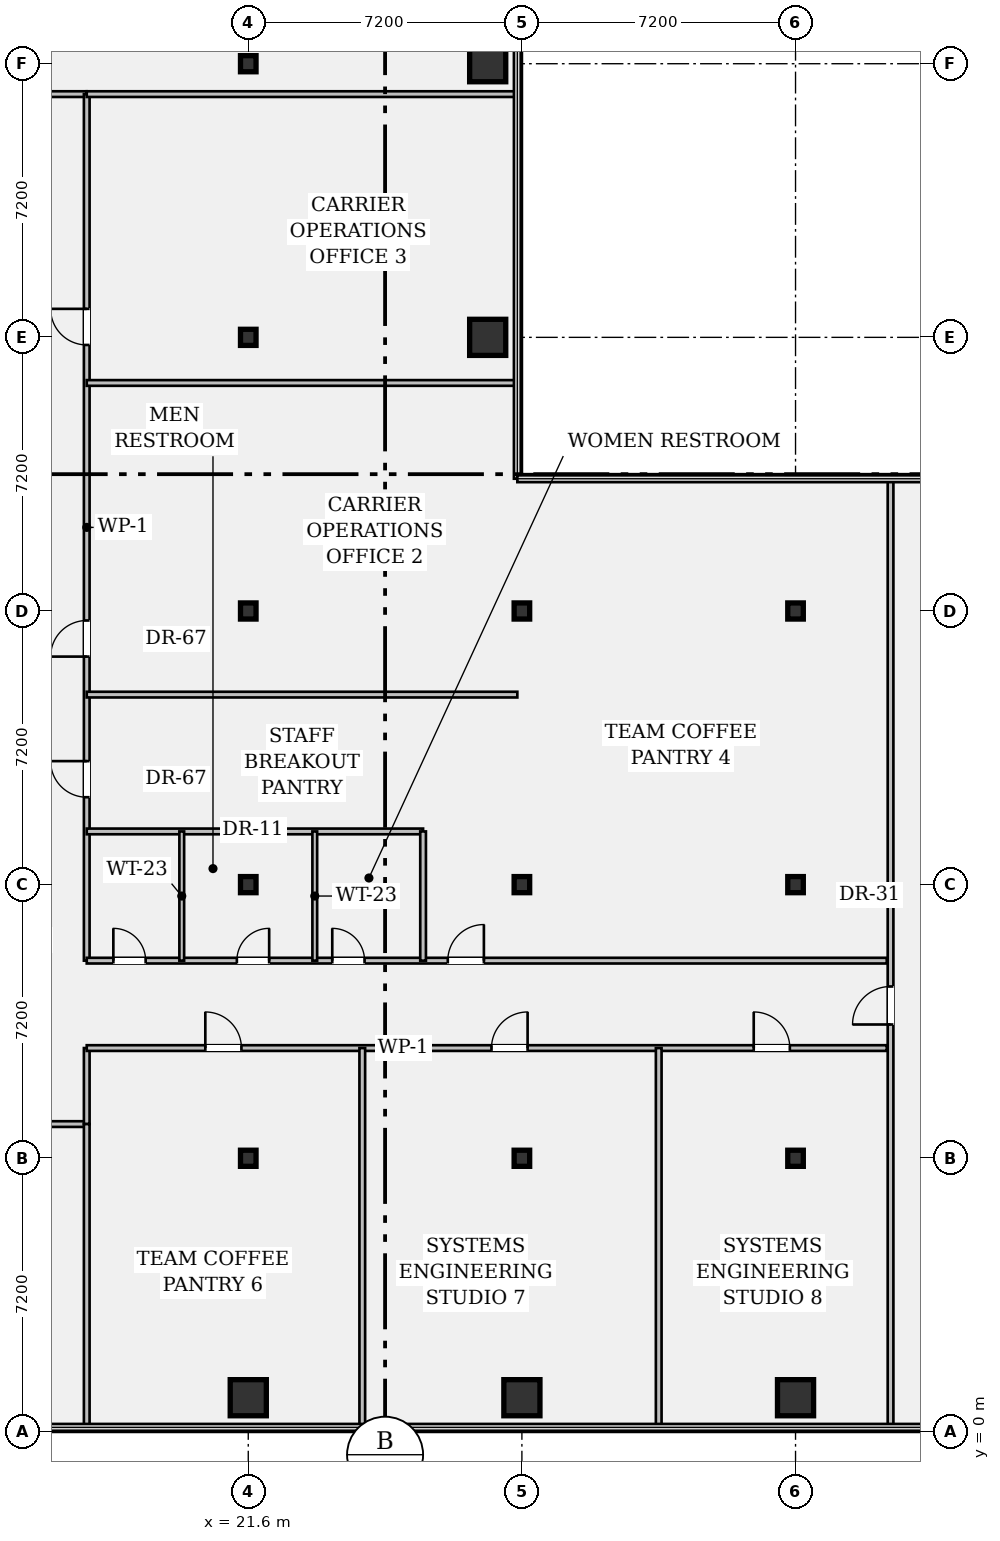
"""IFC4 building model, lengths in metres.
Left out: names, types, materials, properties, quantities, classifications, styles, units other than length and angle.
Written with IfcOpenShell. Run it as: python <this file> out.ifc"""

import sys

from ifc_helpers import new_model, si_unit, direction, frame, frame_2d, origin, origin_2d, place, context, subcontext, project, spatial, rectangle, hollow_rectangle, i_section, extrude, element, fill, save


model = new_model("IFC4")
c1 = context("Model", 3, precision=1e-05, world=origin(), true_north=direction((0.0, 1.0)))
c2 = subcontext(c1, "Body", "Model", "MODEL_VIEW")
j1 = project(units=[si_unit("LENGTHUNIT", "METRE"), si_unit("PLANEANGLEUNIT", "RADIAN")], contexts=[c1])
p1 = place(None, origin())
s1 = spatial("IfcSite", under=j1, at=p1, CompositionType="ELEMENT")
p2 = place(p1, origin())
s2 = spatial("IfcBuilding", under=s1, at=p2, CompositionType="ELEMENT")
p3 = place(p2, frame((0.0, 0.0, 88.9)))
s3 = spatial("IfcBuildingStorey", under=s2, at=p3, CompositionType="ELEMENT", Elevation=88.9)
p4 = place(p3, frame((21.6, 0.9, 0.0), z_axis=(0.0, 0.0, 1.0), x_axis=(1.0, 0.0, 0.0)))
e1 = element("IfcColumn", 1, at=p4, inside=s3, PredefinedType="COLUMN", context=c2, shape_type="SweptSolid", body=[
    extrude(hollow_rectangle(XDim=0.95, YDim=0.95, WallThickness=0.06, at=origin_2d()), origin(), (0.0, 0.0, 1.0), 3.57),
])
for number, where, z_axis, x_axis in (
    (2, (21.6, 7.2, 0.0), (0.0, 0.0, 1.0), (1.0, 0.0, 0.0)),
    (3, (21.6, 14.4, 0.0), (0.0, 0.0, 1.0), (1.0, 0.0, 0.0)),
    (4, (21.6, 21.6, 0.0), (0.0, 0.0, 1.0), (1.0, 0.0, 0.0)),
    (5, (21.6, 28.8, 0.0), (0.0, 0.0, 1.0), (1.0, 0.0, 0.0)),
    (6, (21.6, 36.0, 0.0), (0.0, 0.0, 1.0), (1.0, 0.0, 0.0)),
):
    element("IfcColumn", number, at=place(p3, frame(where, z_axis=z_axis, x_axis=x_axis)), inside=s3, PredefinedType="COLUMN", context=c2, shape_type="SweptSolid", body=[
        extrude(i_section(OverallWidth=0.409, OverallDepth=0.424, WebThickness=0.033, FlangeThickness=0.052, FilletRadius=0.018, at=origin_2d()), origin(), (0.0, 0.0, 1.0), 3.57),
    ])
for number, where, z_axis, x_axis in (
    (7, (27.9, 28.8, 0.0), (0.0, 0.0, 1.0), (1.0, 0.0, 0.0)),
    (8, (27.9, 36.0, 0.0), (0.0, 0.0, 1.0), (1.0, 0.0, 0.0)),
):
    element("IfcColumn", number, at=place(p3, frame(where, z_axis=z_axis, x_axis=x_axis)), inside=s3, PredefinedType="COLUMN", context=c2, shape_type="SweptSolid", body=[
        extrude(hollow_rectangle(XDim=0.95, YDim=0.95, WallThickness=0.06, at=origin_2d()), origin(), (0.0, 0.0, 1.0), 3.85),
    ])
p5 = place(p3, frame((28.8, 0.9, 0.0), z_axis=(0.0, 0.0, 1.0), x_axis=(1.0, 0.0, 0.0)))
e9 = element("IfcColumn", 9, at=p5, inside=s3, PredefinedType="COLUMN", context=c2, shape_type="SweptSolid", body=[
    extrude(hollow_rectangle(XDim=0.95, YDim=0.95, WallThickness=0.06, at=origin_2d()), origin(), (0.0, 0.0, 1.0), 3.57),
])
for number, where, z_axis, x_axis in (
    (10, (28.8, 7.2, 0.0), (0.0, 0.0, 1.0), (1.0, 0.0, 0.0)),
    (11, (28.8, 14.4, 0.0), (0.0, 0.0, 1.0), (1.0, 0.0, 0.0)),
    (12, (28.8, 21.6, 0.0), (0.0, 0.0, 1.0), (1.0, 0.0, 0.0)),
):
    element("IfcColumn", number, at=place(p3, frame(where, z_axis=z_axis, x_axis=x_axis)), inside=s3, PredefinedType="COLUMN", context=c2, shape_type="SweptSolid", body=[
        extrude(i_section(OverallWidth=0.409, OverallDepth=0.424, WebThickness=0.033, FlangeThickness=0.052, FilletRadius=0.018, at=origin_2d()), origin(), (0.0, 0.0, 1.0), 3.57),
    ])
p6 = place(p3, frame((36.0, 0.9, 0.0), z_axis=(0.0, 0.0, 1.0), x_axis=(1.0, 0.0, 0.0)))
e13 = element("IfcColumn", 13, at=p6, inside=s3, PredefinedType="COLUMN", context=c2, shape_type="SweptSolid", body=[
    extrude(hollow_rectangle(XDim=0.95, YDim=0.95, WallThickness=0.06, at=origin_2d()), origin(), (0.0, 0.0, 1.0), 3.57),
])
for number, where, z_axis, x_axis in (
    (14, (36.0, 7.2, 0.0), (0.0, 0.0, 1.0), (1.0, 0.0, 0.0)),
    (15, (36.0, 14.4, 0.0), (0.0, 0.0, 1.0), (1.0, 0.0, 0.0)),
    (16, (36.0, 21.6, 0.0), (0.0, 0.0, 1.0), (1.0, 0.0, 0.0)),
):
    element("IfcColumn", number, at=place(p3, frame(where, z_axis=z_axis, x_axis=x_axis)), inside=s3, PredefinedType="COLUMN", context=c2, shape_type="SweptSolid", body=[
        extrude(i_section(OverallWidth=0.409, OverallDepth=0.424, WebThickness=0.033, FlangeThickness=0.052, FilletRadius=0.018, at=origin_2d()), origin(), (0.0, 0.0, 1.0), 3.57),
    ])
p7 = place(p3, frame((14.4, 8.1, 0.0), z_axis=(0.0, 0.0, 1.0), x_axis=(1.0, 0.0, 0.0)))
e17 = element("IfcWall", 17, at=p7, inside=s3, PredefinedType="PARTITIONING", context=c2, shape_type="SweptSolid", body=[
    extrude(rectangle(XDim=2.95, YDim=0.15, at=frame_2d((1.475, 0.0))), origin(), (0.0, 0.0, 1.0), 3.088),
])
p8 = place(p7, frame((0.95, 0.0, 0.0)))
e18 = element("IfcOpeningElement", 18, at=p8, cuts=e17, PredefinedType="OPENING", context=c2, shape_type="SweptSolid", body=[
    extrude(rectangle(XDim=0.95, YDim=2.15, at=frame_2d((0.475, 1.075))), frame((0.0, 0.087, 0.0), z_axis=(0.0, -1.0, 0.0), x_axis=(1.0, 0.0, 0.0)), (0.0, 0.0, 1.0), 0.174),
])
p9 = place(p3, frame((14.4, 35.2, 0.0), z_axis=(0.0, 0.0, 1.0), x_axis=(1.0, 0.0, 0.0)))
e19 = element("IfcWall", 19, at=p9, inside=s3, PredefinedType="PARTITIONING", context=c2, shape_type="SweptSolid", body=[
    extrude(rectangle(XDim=2.95, YDim=0.15, at=frame_2d((1.475, 0.0))), origin(), (0.0, 0.0, 1.0), 3.088),
])
p10 = place(p9, frame((0.95, 0.0, 0.0)))
e20 = element("IfcOpeningElement", 20, at=p10, cuts=e19, PredefinedType="OPENING", context=c2, shape_type="SweptSolid", body=[
    extrude(rectangle(XDim=1.0, YDim=2.15, at=frame_2d((0.5, 1.075))), frame((0.0, 0.087, 0.0), z_axis=(0.0, -1.0, 0.0), x_axis=(1.0, 0.0, 0.0)), (0.0, 0.0, 1.0), 0.174),
])
p11 = place(p3, frame((17.35, 8.1, 0.0), z_axis=(0.0, 0.0, 1.0), x_axis=(0.0, 1.0, 0.0)))
e21 = element("IfcWall", 21, at=p11, inside=s3, PredefinedType="PARTITIONING", context=c2, shape_type="SweptSolid", body=[
    extrude(rectangle(XDim=2.0, YDim=0.15, at=frame_2d((1.0, 0.0))), origin(), (0.0, 0.0, 1.0), 3.57),
])
p12 = place(p3, frame((17.35, 12.4, 0.0), z_axis=(0.0, 0.0, 1.0), x_axis=(0.0, 1.0, 0.0)))
e22 = element("IfcWall", 22, at=p12, inside=s3, PredefinedType="PARTITIONING", context=c2, shape_type="SweptSolid", body=[
    extrude(rectangle(XDim=22.8, YDim=0.15, at=frame_2d((11.4, 0.0))), origin(), (0.0, 0.0, 1.0), 2.783),
])
p13 = place(p12, frame((4.3, 0.0, 0.0)))
e23 = element("IfcOpeningElement", 23, at=p13, cuts=e22, PredefinedType="OPENING", context=c2, shape_type="SweptSolid", body=[
    extrude(rectangle(XDim=0.95, YDim=2.15, at=frame_2d((0.475, 1.075))), frame((0.0, 0.087, 0.0), z_axis=(0.0, -1.0, 0.0), x_axis=(1.0, 0.0, 0.0)), (0.0, 0.0, 1.0), 0.174),
])
p14 = place(p12, frame((8.0, 0.0, 0.0)))
e24 = element("IfcOpeningElement", 24, at=p14, cuts=e22, PredefinedType="OPENING", context=c2, shape_type="SweptSolid", body=[
    extrude(rectangle(XDim=0.95, YDim=2.15, at=frame_2d((0.475, 1.075))), frame((0.0, 0.087, 0.0), z_axis=(0.0, -1.0, 0.0), x_axis=(1.0, 0.0, 0.0)), (0.0, 0.0, 1.0), 0.174),
])
p15 = place(p12, frame((16.2, 0.0, 0.0)))
e25 = element("IfcOpeningElement", 25, at=p15, cuts=e22, PredefinedType="OPENING", context=c2, shape_type="SweptSolid", body=[
    extrude(rectangle(XDim=0.95, YDim=2.15, at=frame_2d((0.475, 1.075))), frame((0.0, 0.087, 0.0), z_axis=(0.0, -1.0, 0.0), x_axis=(1.0, 0.0, 0.0)), (0.0, 0.0, 1.0), 0.174),
])
p16 = place(p3, frame((17.35, 10.1, 0.0), z_axis=(0.0, 0.0, 1.0), x_axis=(1.0, 0.0, 0.0)))
e26 = element("IfcWall", 26, at=p16, inside=s3, PredefinedType="PARTITIONING", context=c2, shape_type="SweptSolid", body=[
    extrude(rectangle(XDim=21.05, YDim=0.15, at=frame_2d((10.525, 0.0))), origin(), (0.0, 0.0, 1.0), 2.783),
])
p17 = place(p16, frame((3.12, 0.0, 0.0)))
e27 = element("IfcOpeningElement", 27, at=p17, cuts=e26, PredefinedType="OPENING", context=c2, shape_type="SweptSolid", body=[
    extrude(rectangle(XDim=0.95, YDim=2.15, at=frame_2d((0.475, 1.075))), frame((0.0, 0.087, 0.0), z_axis=(0.0, -1.0, 0.0), x_axis=(1.0, 0.0, 0.0)), (0.0, 0.0, 1.0), 0.174),
])
p18 = place(p16, frame((10.65, 0.0, 0.0)))
e28 = element("IfcOpeningElement", 28, at=p18, cuts=e26, PredefinedType="OPENING", context=c2, shape_type="SweptSolid", body=[
    extrude(rectangle(XDim=0.95, YDim=2.15, at=frame_2d((0.475, 1.075))), frame((0.0, 0.087, 0.0), z_axis=(0.0, -1.0, 0.0), x_axis=(1.0, 0.0, 0.0)), (0.0, 0.0, 1.0), 0.174),
])
p19 = place(p16, frame((17.55, 0.0, 0.0)))
e29 = element("IfcOpeningElement", 29, at=p19, cuts=e26, PredefinedType="OPENING", context=c2, shape_type="SweptSolid", body=[
    extrude(rectangle(XDim=0.95, YDim=2.15, at=frame_2d((0.475, 1.075))), frame((0.0, 0.087, 0.0), z_axis=(0.0, -1.0, 0.0), x_axis=(1.0, 0.0, 0.0)), (0.0, 0.0, 1.0), 0.174),
])
p20 = place(p3, frame((17.35, 12.4, 0.0), z_axis=(0.0, 0.0, 1.0), x_axis=(1.0, 0.0, 0.0)))
e30 = element("IfcWall", 30, at=p20, inside=s3, PredefinedType="PARTITIONING", context=c2, shape_type="SweptSolid", body=[
    extrude(rectangle(XDim=21.05, YDim=0.15, at=frame_2d((10.525, 0.0))), origin(), (0.0, 0.0, 1.0), 2.783),
])
p21 = place(p20, frame((0.7, 0.0, 0.0)))
e31 = element("IfcOpeningElement", 31, at=p21, cuts=e30, PredefinedType="OPENING", context=c2, shape_type="SweptSolid", body=[
    extrude(rectangle(XDim=0.85, YDim=2.15, at=frame_2d((0.425, 1.075))), frame((0.0, 0.087, 0.0), z_axis=(0.0, -1.0, 0.0), x_axis=(1.0, 0.0, 0.0)), (0.0, 0.0, 1.0), 0.174),
])
p22 = place(p20, frame((3.95, 0.0, 0.0)))
e32 = element("IfcOpeningElement", 32, at=p22, cuts=e30, PredefinedType="OPENING", context=c2, shape_type="SweptSolid", body=[
    extrude(rectangle(XDim=0.85, YDim=2.15, at=frame_2d((0.425, 1.075))), frame((0.0, 0.087, 0.0), z_axis=(0.0, -1.0, 0.0), x_axis=(1.0, 0.0, 0.0)), (0.0, 0.0, 1.0), 0.174),
])
p23 = place(p20, frame((6.46, 0.0, 0.0)))
e33 = element("IfcOpeningElement", 33, at=p23, cuts=e30, PredefinedType="OPENING", context=c2, shape_type="SweptSolid", body=[
    extrude(rectangle(XDim=0.85, YDim=2.15, at=frame_2d((0.425, 1.075))), frame((0.0, 0.087, 0.0), z_axis=(0.0, -1.0, 0.0), x_axis=(1.0, 0.0, 0.0)), (0.0, 0.0, 1.0), 0.174),
])
p24 = place(p20, frame((9.5, 0.0, 0.0)))
e34 = element("IfcOpeningElement", 34, at=p24, cuts=e30, PredefinedType="OPENING", context=c2, shape_type="SweptSolid", body=[
    extrude(rectangle(XDim=0.95, YDim=2.15, at=frame_2d((0.475, 1.075))), frame((0.0, 0.087, 0.0), z_axis=(0.0, -1.0, 0.0), x_axis=(1.0, 0.0, 0.0)), (0.0, 0.0, 1.0), 0.174),
])
p25 = place(p3, frame((38.5, 0.12, 0.0), z_axis=(0.0, 0.0, 1.0), x_axis=(0.0, 1.0, 0.0)))
e35 = element("IfcWall", 35, at=p25, inside=s3, PredefinedType="PARTITIONING", context=c2, shape_type="SweptSolid", body=[
    extrude(rectangle(XDim=24.96, YDim=0.15, at=frame_2d((12.48, 0.0))), origin(), (0.0, 0.0, 1.0), 2.783),
])
p26 = place(p25, frame((10.6, 0.0, 0.0)))
e36 = element("IfcOpeningElement", 36, at=p26, cuts=e35, PredefinedType="OPENING", context=c2, shape_type="SweptSolid", body=[
    extrude(rectangle(XDim=1.0, YDim=2.15, at=frame_2d((0.5, 1.075))), frame((0.0, 0.087, 0.0), z_axis=(0.0, -1.0, 0.0), x_axis=(1.0, 0.0, 0.0)), (0.0, 0.0, 1.0), 0.174),
])
p27 = place(p3, frame((17.35, 35.2, 0.0), z_axis=(0.0, 0.0, 1.0), x_axis=(1.0, 0.0, 0.0)))
e37 = element("IfcWall", 37, at=p27, inside=s3, PredefinedType="PARTITIONING", context=c2, shape_type="SweptSolid", body=[
    extrude(rectangle(XDim=11.33, YDim=0.15, at=frame_2d((5.665, 0.0))), origin(), (0.0, 0.0, 1.0), 2.783),
])
p28 = place(p3, frame((17.35, 15.8, 0.0), z_axis=(0.0, 0.0, 1.0), x_axis=(1.0, 0.0, 0.0)))
e38 = element("IfcWall", 38, at=p28, inside=s3, PredefinedType="PARTITIONING", context=c2, shape_type="SweptSolid", body=[
    extrude(rectangle(XDim=8.85, YDim=0.15, at=frame_2d((4.425, 0.0))), origin(), (0.0, 0.0, 1.0), 2.783),
])
p29 = place(p3, frame((26.2, 12.4, 0.0), z_axis=(0.0, 0.0, 1.0), x_axis=(0.0, 1.0, 0.0)))
e39 = element("IfcWall", 39, at=p29, inside=s3, PredefinedType="PARTITIONING", context=c2, shape_type="SweptSolid", body=[
    extrude(rectangle(XDim=3.4, YDim=0.15, at=frame_2d((1.7, 0.0))), origin(), (0.0, 0.0, 1.0), 2.783),
])
for number, where, z_axis, x_axis in (
    (40, (19.85, 12.4, 0.0), (0.0, 0.0, 1.0), (0.0, 1.0, 0.0)),
    (41, (23.35, 12.4, 0.0), (0.0, 0.0, 1.0), (0.0, 1.0, 0.0)),
):
    element("IfcWall", number, at=place(p3, frame(where, z_axis=z_axis, x_axis=x_axis)), inside=s3, PredefinedType="PARTITIONING", context=c2, shape_type="SweptSolid", body=[
        extrude(rectangle(XDim=3.4, YDim=0.125, at=frame_2d((1.7, 0.0))), origin(), (0.0, 0.0, 1.0), 2.783),
    ])
for number, where, z_axis, x_axis in (
    (42, (17.35, 19.4, 0.0), (0.0, 0.0, 1.0), (1.0, 0.0, 0.0)),
    (43, (17.35, 27.6, 0.0), (0.0, 0.0, 1.0), (1.0, 0.0, 0.0)),
):
    element("IfcWall", number, at=place(p3, frame(where, z_axis=z_axis, x_axis=x_axis)), inside=s3, PredefinedType="PARTITIONING", context=c2, shape_type="SweptSolid", body=[
        extrude(rectangle(XDim=11.33, YDim=0.15, at=frame_2d((5.665, 0.0))), origin(), (0.0, 0.0, 1.0), 2.783),
    ])
p30 = place(p3, frame((17.35, 0.12, 0.0), z_axis=(0.0, 0.0, 1.0), x_axis=(0.0, 1.0, 0.0)))
e44 = element("IfcWall", 44, at=p30, inside=s3, PredefinedType="PARTITIONING", context=c2, shape_type="SweptSolid", body=[
    extrude(rectangle(XDim=7.98, YDim=0.15, at=frame_2d((3.99, 0.0))), origin(), (0.0, 0.0, 1.0), 2.783),
])
for number, where, z_axis, x_axis in (
    (45, (24.6, 0.12, 0.0), (0.0, 0.0, 1.0), (0.0, 1.0, 0.0)),
    (46, (32.4, 0.12, 0.0), (0.0, 0.0, 1.0), (0.0, 1.0, 0.0)),
):
    element("IfcWall", number, at=place(p3, frame(where, z_axis=z_axis, x_axis=x_axis)), inside=s3, PredefinedType="PARTITIONING", context=c2, shape_type="SweptSolid", body=[
        extrude(rectangle(XDim=9.98, YDim=0.15, at=frame_2d((4.99, 0.0))), origin(), (0.0, 0.0, 1.0), 2.783),
    ])
p31 = place(p21, origin())
e47 = element("IfcDoor", 47, at=p31, inside=s3, OperationType="SINGLE_SWING_LEFT", PredefinedType="DOOR", context=c2, shape_type="SweptSolid", body=[
    extrude(rectangle(XDim=0.85, YDim=2.15, at=frame_2d((0.425, 1.075))), frame((0.0, 0.025, 0.0), z_axis=(0.0, -1.0, 0.0), x_axis=(1.0, 0.0, 0.0)), (0.0, 0.0, 1.0), 0.05),
])
fill(e31, e47)
p32 = place(p22, origin())
e48 = element("IfcDoor", 48, at=p32, inside=s3, OperationType="SINGLE_SWING_RIGHT", PredefinedType="DOOR", context=c2, shape_type="SweptSolid", body=[
    extrude(rectangle(XDim=0.85, YDim=2.15, at=frame_2d((0.425, 1.075))), frame((0.0, 0.025, 0.0), z_axis=(0.0, -1.0, 0.0), x_axis=(1.0, 0.0, 0.0)), (0.0, 0.0, 1.0), 0.05),
])
fill(e32, e48)
p33 = place(p23, origin())
e49 = element("IfcDoor", 49, at=p33, inside=s3, OperationType="SINGLE_SWING_LEFT", PredefinedType="DOOR", context=c2, shape_type="SweptSolid", body=[
    extrude(rectangle(XDim=0.85, YDim=2.15, at=frame_2d((0.425, 1.075))), frame((0.0, 0.025, 0.0), z_axis=(0.0, -1.0, 0.0), x_axis=(1.0, 0.0, 0.0)), (0.0, 0.0, 1.0), 0.05),
])
fill(e33, e49)
p34 = place(p13, origin())
e50 = element("IfcDoor", 50, at=p34, inside=s3, OperationType="SINGLE_SWING_RIGHT", PredefinedType="DOOR", context=c2, shape_type="SweptSolid", body=[
    extrude(rectangle(XDim=0.95, YDim=2.15, at=frame_2d((0.475, 1.075))), frame((0.0, 0.025, 0.0), z_axis=(0.0, -1.0, 0.0), x_axis=(1.0, 0.0, 0.0)), (0.0, 0.0, 1.0), 0.05),
])
fill(e23, e50)
p35 = place(p14, origin())
e51 = element("IfcDoor", 51, at=p35, inside=s3, OperationType="SINGLE_SWING_LEFT", PredefinedType="DOOR", context=c2, shape_type="SweptSolid", body=[
    extrude(rectangle(XDim=0.95, YDim=2.15, at=frame_2d((0.475, 1.075))), frame((0.0, 0.025, 0.0), z_axis=(0.0, -1.0, 0.0), x_axis=(1.0, 0.0, 0.0)), (0.0, 0.0, 1.0), 0.05),
])
fill(e24, e51)
p36 = place(p15, origin())
e52 = element("IfcDoor", 52, at=p36, inside=s3, OperationType="SINGLE_SWING_RIGHT", PredefinedType="DOOR", context=c2, shape_type="SweptSolid", body=[
    extrude(rectangle(XDim=0.95, YDim=2.15, at=frame_2d((0.475, 1.075))), frame((0.0, 0.025, 0.0), z_axis=(0.0, -1.0, 0.0), x_axis=(1.0, 0.0, 0.0)), (0.0, 0.0, 1.0), 0.05),
])
fill(e25, e52)
p37 = place(p24, origin())
e53 = element("IfcDoor", 53, at=p37, inside=s3, OperationType="SINGLE_SWING_RIGHT", PredefinedType="DOOR", context=c2, shape_type="SweptSolid", body=[
    extrude(rectangle(XDim=0.95, YDim=2.15, at=frame_2d((0.475, 1.075))), frame((0.0, 0.025, 0.0), z_axis=(0.0, -1.0, 0.0), x_axis=(1.0, 0.0, 0.0)), (0.0, 0.0, 1.0), 0.05),
])
fill(e34, e53)
p38 = place(p17, origin())
e54 = element("IfcDoor", 54, at=p38, inside=s3, OperationType="SINGLE_SWING_LEFT", PredefinedType="DOOR", context=c2, shape_type="SweptSolid", body=[
    extrude(rectangle(XDim=0.95, YDim=2.15, at=frame_2d((0.475, 1.075))), frame((0.0, 0.025, 0.0), z_axis=(0.0, -1.0, 0.0), x_axis=(1.0, 0.0, 0.0)), (0.0, 0.0, 1.0), 0.05),
])
fill(e27, e54)
p39 = place(p18, origin())
e55 = element("IfcDoor", 55, at=p39, inside=s3, OperationType="SINGLE_SWING_RIGHT", PredefinedType="DOOR", context=c2, shape_type="SweptSolid", body=[
    extrude(rectangle(XDim=0.95, YDim=2.15, at=frame_2d((0.475, 1.075))), frame((0.0, 0.025, 0.0), z_axis=(0.0, -1.0, 0.0), x_axis=(1.0, 0.0, 0.0)), (0.0, 0.0, 1.0), 0.05),
])
fill(e28, e55)
p40 = place(p19, origin())
e56 = element("IfcDoor", 56, at=p40, inside=s3, OperationType="SINGLE_SWING_LEFT", PredefinedType="DOOR", context=c2, shape_type="SweptSolid", body=[
    extrude(rectangle(XDim=0.95, YDim=2.15, at=frame_2d((0.475, 1.075))), frame((0.0, 0.025, 0.0), z_axis=(0.0, -1.0, 0.0), x_axis=(1.0, 0.0, 0.0)), (0.0, 0.0, 1.0), 0.05),
])
fill(e29, e56)
p41 = place(p26, origin())
e57 = element("IfcDoor", 57, at=p41, inside=s3, OperationType="SINGLE_SWING_LEFT", PredefinedType="DOOR", context=c2, shape_type="SweptSolid", body=[
    extrude(rectangle(XDim=1.0, YDim=2.15, at=frame_2d((0.5, 1.075))), frame((0.0, 0.025, 0.0), z_axis=(0.0, -1.0, 0.0), x_axis=(1.0, 0.0, 0.0)), (0.0, 0.0, 1.0), 0.05),
])
fill(e36, e57)
save(model, sys.argv[1])
